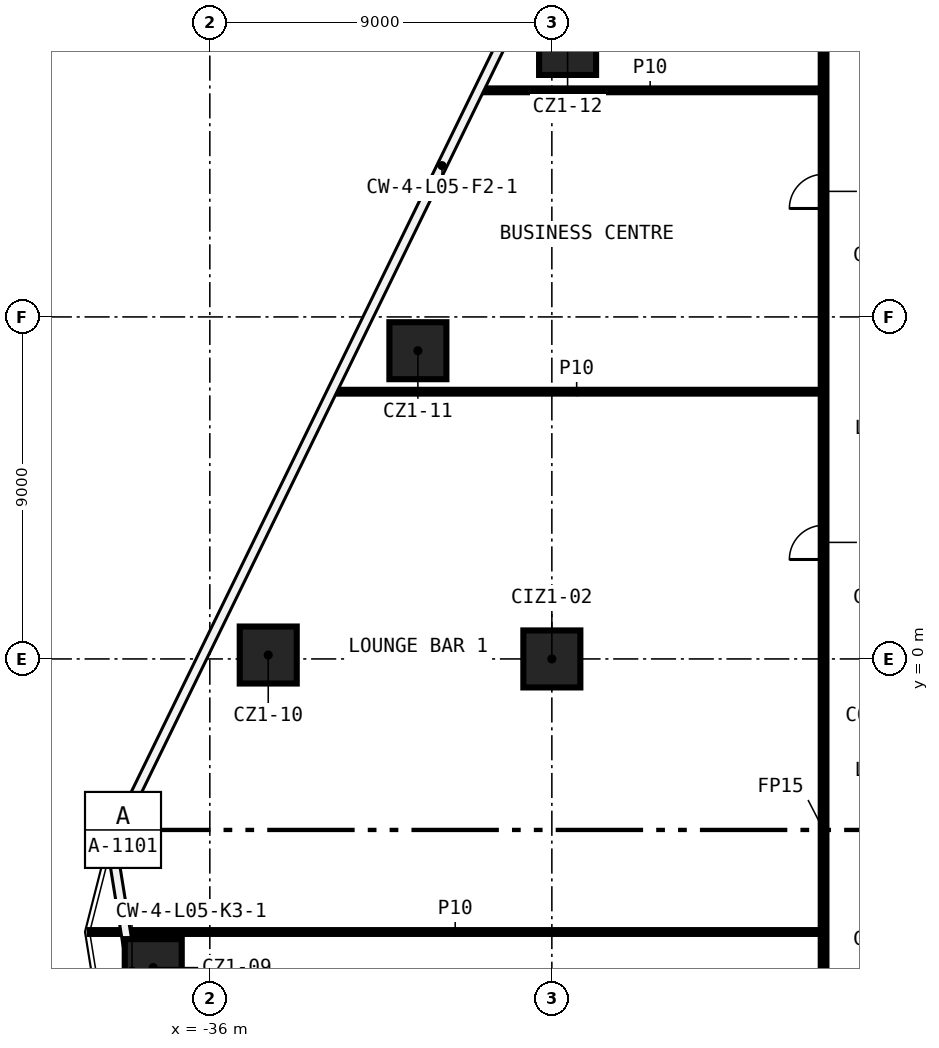
"""IFC4 building model, lengths in metres.
Left out: names, types, materials, properties, quantities, classifications, styles, units other than length and angle.
Written with IfcOpenShell. Run it as: python <this file> out.ifc"""

import sys

from ifc_helpers import new_model, si_unit, direction, frame, frame_2d, origin, origin_2d, place, context, subcontext, project, spatial, rectangle, extrude, element, fill, save


model = new_model("IFC4")
c1 = context("Model", 3, precision=1e-05, world=origin(), true_north=direction((0.0, 1.0)))
c2 = subcontext(c1, "Body", "Model", "MODEL_VIEW")
j1 = project(units=[si_unit("LENGTHUNIT", "METRE"), si_unit("PLANEANGLEUNIT", "RADIAN")], contexts=[c1])
p1 = place(None, origin())
s1 = spatial("IfcSite", under=j1, at=p1, CompositionType="ELEMENT")
p2 = place(p1, origin())
s2 = spatial("IfcBuilding", under=s1, at=p2, CompositionType="ELEMENT")
p3 = place(p2, frame((0.0, 0.0, 38.0)))
s3 = spatial("IfcBuildingStorey", under=s2, at=p3, CompositionType="ELEMENT", Elevation=38.0)
for number, where, z_axis, x_axis in (
    (1, (-37.489, -8.123, 0.0), (0.0, 0.0, 1.0), (1.0, 0.0, 0.0)),
    (2, (-34.463, 0.103, 0.0), (0.0, 0.0, 1.0), (1.0, 0.0, 0.0)),
    (3, (-30.525, 8.111, 0.0), (0.0, 0.0, 1.0), (1.0, 0.0, 0.0)),
    (4, (-26.586, 16.118, 0.0), (0.0, 0.0, 1.0), (1.0, 0.0, 0.0)),
    (5, (-27.0, 0.0, 0.0), (0.0, 0.0, 1.0), (1.0, 0.0, 0.0)),
):
    element("IfcColumn", number, at=place(p3, frame(where, z_axis=z_axis, x_axis=x_axis)), inside=s3, PredefinedType="COLUMN", context=c2, shape_type="SweptSolid", body=[
        extrude(rectangle(XDim=1.5, YDim=1.5, at=origin_2d()), origin(), (0.0, 0.0, 1.0), 5.6),
    ])
p4 = place(p3, frame((-39.162, -7.186, 0.0), z_axis=(0.0, 0.0, 1.0), x_axis=(1.0, 0.0, 0.0)))
e6 = element("IfcWall", 6, at=p4, inside=s3, PredefinedType="PARTITIONING", context=c2, shape_type="SweptSolid", body=[
    extrude(rectangle(XDim=19.237, YDim=0.1, at=frame_2d((9.618, 0.0))), origin(), (0.0, 0.0, 1.0), 5.6),
])
p5 = place(p3, frame((-32.77, 7.032, 0.0), z_axis=(0.0, 0.0, 1.0), x_axis=(1.0, 0.0, 0.0)))
e7 = element("IfcWall", 7, at=p5, inside=s3, PredefinedType="PARTITIONING", context=c2, shape_type="SweptSolid", body=[
    extrude(rectangle(XDim=12.845, YDim=0.1, at=frame_2d((6.422, 0.0))), origin(), (0.0, 0.0, 1.0), 5.6),
])
p6 = place(p3, frame((-28.902, 14.963, 0.0), z_axis=(0.0, 0.0, 1.0), x_axis=(1.0, 0.0, 0.0)))
e8 = element("IfcWall", 8, at=p6, inside=s3, PredefinedType="PARTITIONING", context=c2, shape_type="SweptSolid", body=[
    extrude(rectangle(XDim=8.977, YDim=0.1, at=frame_2d((4.489, 0.0))), origin(), (0.0, 0.0, 1.0), 5.6),
])
p7 = place(p3, frame((-19.85, -16.775, 0.0), z_axis=(0.0, 0.0, 1.0), x_axis=(0.0, 1.0, 0.0)))
e9 = element("IfcWall", 9, at=p7, inside=s3, PredefinedType="PARTITIONING", context=c2, shape_type="SweptSolid", body=[
    extrude(rectangle(XDim=33.55, YDim=0.15, at=frame_2d((16.775, 0.0))), origin(), (0.0, 0.0, 1.0), 5.6),
])
p8 = place(p7, frame((19.392, 0.0, 0.0)))
e10 = element("IfcOpeningElement", 10, at=p8, cuts=e9, PredefinedType="OPENING", context=c2, shape_type="SweptSolid", body=[
    extrude(rectangle(XDim=0.9, YDim=2.1, at=frame_2d((0.45, 1.05))), frame((0.0, 0.085, 0.0), z_axis=(0.0, -1.0, 0.0), x_axis=(1.0, 0.0, 0.0)), (0.0, 0.0, 1.0), 0.17),
])
p9 = place(p7, frame((4.251, 0.0, 0.0)))
e11 = element("IfcOpeningElement", 11, at=p9, cuts=e9, PredefinedType="OPENING", context=c2, shape_type="SweptSolid", body=[
    extrude(rectangle(XDim=0.9, YDim=2.1, at=frame_2d((0.45, 1.05))), frame((0.0, 0.085, 0.0), z_axis=(0.0, -1.0, 0.0), x_axis=(1.0, 0.0, 0.0)), (0.0, 0.0, 1.0), 0.17),
])
p10 = place(p7, frame((28.629, 0.0, 0.0)))
e12 = element("IfcOpeningElement", 12, at=p10, cuts=e9, PredefinedType="OPENING", context=c2, shape_type="SweptSolid", body=[
    extrude(rectangle(XDim=0.9, YDim=2.1, at=frame_2d((0.45, 1.05))), frame((0.0, 0.085, 0.0), z_axis=(0.0, -1.0, 0.0), x_axis=(1.0, 0.0, 0.0)), (0.0, 0.0, 1.0), 0.17),
])
p11 = place(p8, origin())
e13 = element("IfcDoor", 13, at=p11, inside=s3, OperationType="SINGLE_SWING_RIGHT", PredefinedType="DOOR", context=c2, shape_type="SweptSolid", body=[
    extrude(rectangle(XDim=0.9, YDim=2.1, at=frame_2d((0.45, 1.05))), frame((0.0, 0.025, 0.0), z_axis=(0.0, -1.0, 0.0), x_axis=(1.0, 0.0, 0.0)), (0.0, 0.0, 1.0), 0.05),
])
fill(e10, e13)
p12 = place(p10, origin())
e14 = element("IfcDoor", 14, at=p12, inside=s3, OperationType="SINGLE_SWING_LEFT", PredefinedType="DOOR", context=c2, shape_type="SweptSolid", body=[
    extrude(rectangle(XDim=0.9, YDim=2.1, at=frame_2d((0.45, 1.05))), frame((0.0, 0.025, 0.0), z_axis=(0.0, -1.0, 0.0), x_axis=(1.0, 0.0, 0.0)), (0.0, 0.0, 1.0), 0.05),
])
fill(e12, e14)
save(model, sys.argv[1])
